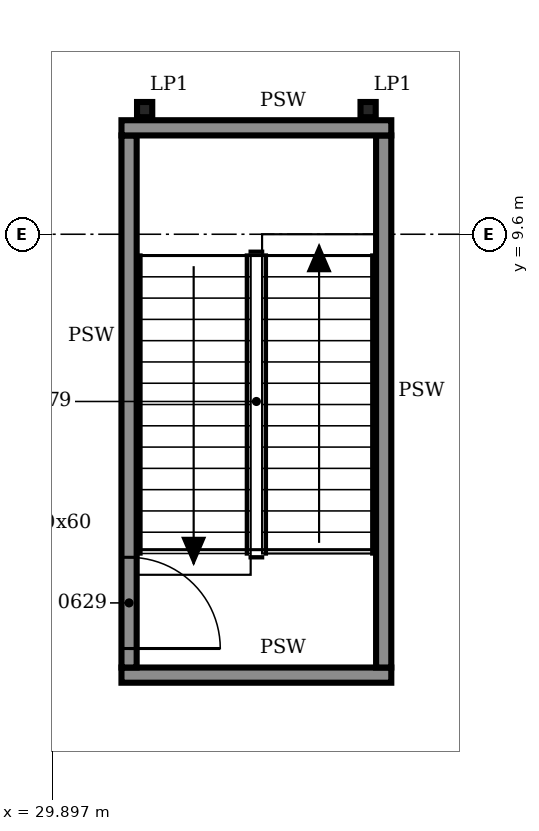
"""IFC4 building model, lengths in metres.
Left out: names, types, materials, properties, quantities, classifications, styles, units other than length and angle.
Written with IfcOpenShell. Run it as: python <this file> out.ifc"""

import sys

from ifc_helpers import new_model, si_unit, direction, frame, frame_2d, origin, origin_2d, place, context, subcontext, project, spatial, rectangle, i_section, extrude, element, fill, save


model = new_model("IFC4")
c1 = context("Model", 3, precision=1e-05, world=origin(), true_north=direction((0.0, 1.0)))
c2 = subcontext(c1, "Body", "Model", "MODEL_VIEW")
j1 = project(units=[si_unit("LENGTHUNIT", "METRE"), si_unit("PLANEANGLEUNIT", "RADIAN")], contexts=[c1])
p1 = place(None, origin())
s1 = spatial("IfcSite", under=j1, at=p1, CompositionType="ELEMENT")
p2 = place(p1, origin())
s2 = spatial("IfcBuilding", under=s1, at=p2, CompositionType="ELEMENT")
p3 = place(p2, frame((0.0, 0.0, 35.4)))
s3 = spatial("IfcBuildingStorey", under=s2, at=p3, CompositionType="ELEMENT", Elevation=35.4)
for number, where, z_axis, x_axis in (
    (1, (31.105, 11.24, 0.0), (0.0, 0.0, 1.0), (1.0, 0.0, 0.0)),
    (2, (34.045, 11.24, 0.0), (0.0, 0.0, 1.0), (1.0, 0.0, 0.0)),
):
    element("IfcColumn", number, at=place(p3, frame(where, z_axis=z_axis, x_axis=x_axis)), inside=s3, PredefinedType="COLUMN", context=c2, shape_type="SweptSolid", body=[
        extrude(i_section(OverallWidth=0.2, OverallDepth=0.2, WebThickness=0.009, FlangeThickness=0.015, FilletRadius=0.018, at=origin_2d()), origin(), (0.0, 0.0, 1.0), 2.2),
    ])
p4 = place(p3, frame((30.8, 3.8, 0.0), z_axis=(0.0, 0.0, 1.0), x_axis=(1.0, 0.0, 0.0)))
e3 = element("IfcWall", 3, at=p4, inside=s3, PredefinedType="SOLIDWALL", context=c2, shape_type="SweptSolid", body=[
    extrude(rectangle(XDim=3.55, YDim=0.2, at=frame_2d((1.775, 0.0))), origin(), (0.0, 0.0, 1.0), 4.65),
])
p5 = place(p3, frame((30.9, 3.9, 0.0), z_axis=(0.0, 0.0, 1.0), x_axis=(0.0, 1.0, 0.0)))
e4 = element("IfcWall", 4, at=p5, inside=s3, PredefinedType="SOLIDWALL", context=c2, shape_type="SweptSolid", body=[
    extrude(rectangle(XDim=7.0, YDim=0.2, at=frame_2d((3.5, 0.0))), origin(), (0.0, 0.0, 1.0), 4.65),
])
p6 = place(p5, frame((0.25, 0.0, 0.0)))
e5 = element("IfcOpeningElement", 5, at=p6, cuts=e4, PredefinedType="OPENING", context=c2, shape_type="SweptSolid", body=[
    extrude(rectangle(XDim=1.2, YDim=2.1, at=frame_2d((0.6, 1.05))), frame((0.0, 0.11, 0.0), z_axis=(0.0, -1.0, 0.0), x_axis=(1.0, 0.0, 0.0)), (0.0, 0.0, 1.0), 0.22),
])
p7 = place(p3, frame((34.25, 3.9, 0.0), z_axis=(0.0, 0.0, 1.0), x_axis=(0.0, 1.0, 0.0)))
e6 = element("IfcWall", 6, at=p7, inside=s3, PredefinedType="SOLIDWALL", context=c2, shape_type="SweptSolid", body=[
    extrude(rectangle(XDim=7.0, YDim=0.2, at=frame_2d((3.5, 0.0))), origin(), (0.0, 0.0, 1.0), 4.65),
])
p8 = place(p3, frame((30.8, 11.0, 0.0), z_axis=(0.0, 0.0, 1.0), x_axis=(1.0, 0.0, 0.0)))
e7 = element("IfcWall", 7, at=p8, inside=s3, PredefinedType="SOLIDWALL", context=c2, shape_type="SweptSolid", body=[
    extrude(rectangle(XDim=3.55, YDim=0.2, at=frame_2d((1.775, 0.0))), origin(), (0.0, 0.0, 1.0), 4.65),
])
p9 = place(p6, frame((1.2, 0.0, 0.0), z_axis=(0.0, 0.0, 1.0), x_axis=(-1.0, 0.0, 0.0)))
e8 = element("IfcDoor", 8, at=p9, inside=s3, OperationType="SINGLE_SWING_RIGHT", PredefinedType="DOOR", context=c2, shape_type="SweptSolid", body=[
    extrude(rectangle(XDim=1.2, YDim=2.1, at=frame_2d((0.6, 1.05))), frame((0.0, 0.025, 0.0), z_axis=(0.0, -1.0, 0.0), x_axis=(1.0, 0.0, 0.0)), (0.0, 0.0, 1.0), 0.05),
])
fill(e5, e8)
save(model, sys.argv[1])
